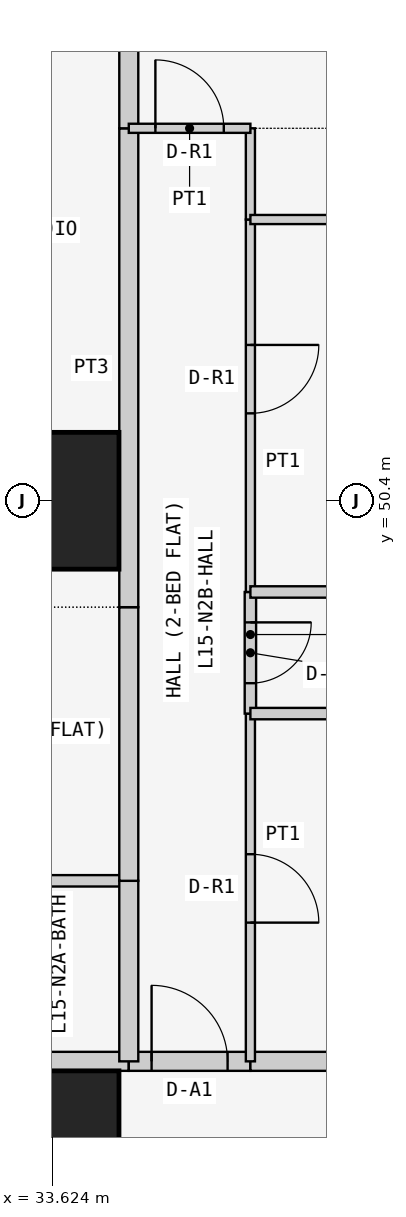
"""IFC4 building model, lengths in metres.
Left out: names, types, materials, properties, quantities, classifications, styles, units other than length and angle.
Written with IfcOpenShell. Run it as: python <this file> out.ifc"""

import sys

from ifc_helpers import new_model, si_unit, direction, frame, frame_2d, origin, origin_2d, place, context, subcontext, project, spatial, rectangle, extrude, element, fill, save


model = new_model("IFC4")
c1 = context("Model", 3, precision=1e-05, world=origin(), true_north=direction((0.0, 1.0)))
c2 = subcontext(c1, "Body", "Model", "MODEL_VIEW")
j1 = project(units=[si_unit("LENGTHUNIT", "METRE"), si_unit("PLANEANGLEUNIT", "RADIAN")], contexts=[c1])
p1 = place(None, origin())
s1 = spatial("IfcSite", under=j1, at=p1, CompositionType="ELEMENT")
p2 = place(p1, origin())
s2 = spatial("IfcBuilding", under=s1, at=p2, CompositionType="ELEMENT")
p3 = place(p2, frame((0.0, 0.0, 63.3)))
s3 = spatial("IfcBuildingStorey", under=s2, at=p3, CompositionType="ELEMENT", Elevation=63.3)
for number, where, z_axis, x_axis in (
    (1, (33.6, 42.0, 0.0), (0.0, 0.0, 1.0), (1.0, 0.0, 0.0)),
    (2, (33.6, 50.4, 0.0), (0.0, 0.0, 1.0), (1.0, 0.0, 0.0)),
):
    element("IfcColumn", number, at=place(p3, frame(where, z_axis=z_axis, x_axis=x_axis)), inside=s3, PredefinedType="COLUMN", context=c2, shape_type="SweptSolid", body=[
        extrude(rectangle(XDim=1.8, YDim=1.8, at=origin_2d()), origin(), (0.0, 0.0, 1.0), 3.6),
    ])
p4 = place(p3, frame((32.0, 43.025, 0.0), z_axis=(0.0, 0.0, 1.0), x_axis=(1.0, 0.0, 0.0)))
e3 = element("IfcWall", 3, at=p4, inside=s3, PredefinedType="PARTITIONING", context=c2, shape_type="SweptSolid", body=[
    extrude(rectangle(XDim=2.629, YDim=0.25, at=frame_2d((1.314, 0.0))), origin(), (0.0, 0.0, 1.0), 3.45),
])
p5 = place(p3, frame((34.629, 43.025, 0.0), z_axis=(0.0, 0.0, 1.0), x_axis=(1.0, 0.0, 0.0)))
e4 = element("IfcWall", 4, at=p5, inside=s3, PredefinedType="PARTITIONING", context=c2, shape_type="SweptSolid", body=[
    extrude(rectangle(XDim=1.6, YDim=0.25, at=frame_2d((0.8, 0.0))), origin(), (0.0, 0.0, 1.0), 3.45),
])
p6 = place(p5, frame((0.3, 0.0, 0.0)))
e5 = element("IfcOpeningElement", 5, at=p6, cuts=e4, PredefinedType="OPENING", context=c2, shape_type="SweptSolid", body=[
    extrude(rectangle(XDim=1.0, YDim=2.1, at=frame_2d((0.5, 1.05))), frame((0.0, 0.135, 0.0), z_axis=(0.0, -1.0, 0.0), x_axis=(1.0, 0.0, 0.0)), (0.0, 0.0, 1.0), 0.27),
])
p7 = place(p3, frame((36.229, 43.025, 0.0), z_axis=(0.0, 0.0, 1.0), x_axis=(1.0, 0.0, 0.0)))
e6 = element("IfcWall", 6, at=p7, inside=s3, PredefinedType="PARTITIONING", context=c2, shape_type="SweptSolid", body=[
    extrude(rectangle(XDim=6.471, YDim=0.25, at=frame_2d((3.235, 0.0))), origin(), (0.0, 0.0, 1.0), 3.45),
])
p8 = place(p3, frame((32.0, 45.4, 0.0), z_axis=(0.0, 0.0, 1.0), x_axis=(1.0, 0.0, 0.0)))
e7 = element("IfcWall", 7, at=p8, inside=s3, PredefinedType="PARTITIONING", context=c2, shape_type="SweptSolid", body=[
    extrude(rectangle(XDim=2.629, YDim=0.15, at=frame_2d((1.314, 0.0))), origin(), (0.0, 0.0, 1.0), 3.45),
])
p9 = place(p3, frame((34.629, 45.4, 0.0), z_axis=(0.0, 0.0, 1.0), x_axis=(0.0, -1.0, 0.0)))
e8 = element("IfcWall", 8, at=p9, inside=s3, PredefinedType="PARTITIONING", context=c2, shape_type="SweptSolid", body=[
    extrude(rectangle(XDim=2.375, YDim=0.25, at=frame_2d((1.188, 0.0))), origin(), (0.0, 0.0, 1.0), 3.45),
])
p10 = place(p3, frame((34.629, 49.0, 0.0), z_axis=(0.0, 0.0, 1.0), x_axis=(0.0, -1.0, 0.0)))
e9 = element("IfcWall", 9, at=p10, inside=s3, PredefinedType="PARTITIONING", context=c2, shape_type="SweptSolid", body=[
    extrude(rectangle(XDim=3.6, YDim=0.25, at=frame_2d((1.8, 0.0))), origin(), (0.0, 0.0, 1.0), 3.45),
])
p11 = place(p3, frame((34.629, 55.3, 0.0), z_axis=(0.0, 0.0, 1.0), x_axis=(0.0, -1.0, 0.0)))
e10 = element("IfcWall", 10, at=p11, inside=s3, PredefinedType="PARTITIONING", context=c2, shape_type="SweptSolid", body=[
    extrude(rectangle(XDim=6.3, YDim=0.25, at=frame_2d((3.15, 0.0))), origin(), (0.0, 0.0, 1.0), 3.45),
])
p12 = place(p3, frame((34.629, 59.45, 0.0), z_axis=(0.0, 0.0, 1.0), x_axis=(0.0, -1.0, 0.0)))
e11 = element("IfcWall", 11, at=p12, inside=s3, PredefinedType="PARTITIONING", context=c2, shape_type="SweptSolid", body=[
    extrude(rectangle(XDim=4.15, YDim=0.25, at=frame_2d((2.075, 0.0))), origin(), (0.0, 0.0, 1.0), 3.45),
])
p13 = place(p3, frame((36.229, 47.6, 0.0), z_axis=(0.0, 0.0, 1.0), x_axis=(0.0, -1.0, 0.0)))
e12 = element("IfcWall", 12, at=p13, inside=s3, PredefinedType="PARTITIONING", context=c2, shape_type="SweptSolid", body=[
    extrude(rectangle(XDim=4.575, YDim=0.12, at=frame_2d((2.288, 0.0))), origin(), (0.0, 0.0, 1.0), 3.45),
])
p14 = place(p13, frame((1.85, 0.0, 0.0)))
e13 = element("IfcOpeningElement", 13, at=p14, cuts=e12, PredefinedType="OPENING", context=c2, shape_type="SweptSolid", body=[
    extrude(rectangle(XDim=0.9, YDim=2.1, at=frame_2d((0.45, 1.05))), frame((0.0, 0.07, 0.0), z_axis=(0.0, -1.0, 0.0), x_axis=(1.0, 0.0, 0.0)), (0.0, 0.0, 1.0), 0.14),
])
p15 = place(p3, frame((36.229, 49.2, 0.0), z_axis=(0.0, 0.0, 1.0), x_axis=(0.0, -1.0, 0.0)))
e14 = element("IfcWall", 14, at=p15, inside=s3, PredefinedType="PARTITIONING", context=c2, shape_type="SweptSolid", body=[
    extrude(rectangle(XDim=1.6, YDim=0.15, at=frame_2d((0.8, 0.0))), origin(), (0.0, 0.0, 1.0), 3.45),
])
p16 = place(p15, frame((0.4, 0.0, 0.0)))
e15 = element("IfcOpeningElement", 15, at=p16, cuts=e14, PredefinedType="OPENING", context=c2, shape_type="SweptSolid", body=[
    extrude(rectangle(XDim=0.8, YDim=2.1, at=frame_2d((0.4, 1.05))), frame((0.0, 0.085, 0.0), z_axis=(0.0, -1.0, 0.0), x_axis=(1.0, 0.0, 0.0)), (0.0, 0.0, 1.0), 0.17),
])
p17 = place(p3, frame((36.229, 54.1, 0.0), z_axis=(0.0, 0.0, 1.0), x_axis=(0.0, -1.0, 0.0)))
e16 = element("IfcWall", 16, at=p17, inside=s3, PredefinedType="PARTITIONING", context=c2, shape_type="SweptSolid", body=[
    extrude(rectangle(XDim=4.9, YDim=0.12, at=frame_2d((2.45, 0.0))), origin(), (0.0, 0.0, 1.0), 3.45),
])
p18 = place(p17, frame((1.65, 0.0, 0.0)))
e17 = element("IfcOpeningElement", 17, at=p18, cuts=e16, PredefinedType="OPENING", context=c2, shape_type="SweptSolid", body=[
    extrude(rectangle(XDim=0.9, YDim=2.1, at=frame_2d((0.45, 1.05))), frame((0.0, 0.07, 0.0), z_axis=(0.0, -1.0, 0.0), x_axis=(1.0, 0.0, 0.0)), (0.0, 0.0, 1.0), 0.14),
])
p19 = place(p3, frame((36.229, 55.3, 0.0), z_axis=(0.0, 0.0, 1.0), x_axis=(0.0, -1.0, 0.0)))
e18 = element("IfcWall", 18, at=p19, inside=s3, PredefinedType="PARTITIONING", context=c2, shape_type="SweptSolid", body=[
    extrude(rectangle(XDim=1.2, YDim=0.12, at=frame_2d((0.6, 0.0))), origin(), (0.0, 0.0, 1.0), 3.45),
])
p20 = place(p3, frame((34.629, 55.3, 0.0), z_axis=(0.0, 0.0, 1.0), x_axis=(1.0, 0.0, 0.0)))
e19 = element("IfcWall", 19, at=p20, inside=s3, PredefinedType="PARTITIONING", context=c2, shape_type="SweptSolid", body=[
    extrude(rectangle(XDim=1.6, YDim=0.12, at=frame_2d((0.8, 0.0))), origin(), (0.0, 0.0, 1.0), 3.45),
])
p21 = place(p20, frame((0.35, 0.0, 0.0)))
e20 = element("IfcOpeningElement", 20, at=p21, cuts=e19, PredefinedType="OPENING", context=c2, shape_type="SweptSolid", body=[
    extrude(rectangle(XDim=0.9, YDim=2.1, at=frame_2d((0.45, 1.05))), frame((0.0, 0.07, 0.0), z_axis=(0.0, -1.0, 0.0), x_axis=(1.0, 0.0, 0.0)), (0.0, 0.0, 1.0), 0.14),
])
for number, where, z_axis, x_axis in (
    (21, (36.229, 47.6, 0.0), (0.0, 0.0, 1.0), (1.0, 0.0, 0.0)),
    (22, (36.229, 49.2, 0.0), (0.0, 0.0, 1.0), (1.0, 0.0, 0.0)),
):
    element("IfcWall", number, at=place(p3, frame(where, z_axis=z_axis, x_axis=x_axis)), inside=s3, PredefinedType="PARTITIONING", context=c2, shape_type="SweptSolid", body=[
        extrude(rectangle(XDim=6.471, YDim=0.15, at=frame_2d((3.235, 0.0))), origin(), (0.0, 0.0, 1.0), 3.45),
    ])
p22 = place(p3, frame((36.229, 54.1, 0.0), z_axis=(0.0, 0.0, 1.0), x_axis=(1.0, 0.0, 0.0)))
e23 = element("IfcWall", 23, at=p22, inside=s3, PredefinedType="PARTITIONING", context=c2, shape_type="SweptSolid", body=[
    extrude(rectangle(XDim=6.471, YDim=0.12, at=frame_2d((3.235, 0.0))), origin(), (0.0, 0.0, 1.0), 3.45),
])
p23 = place(p6, origin())
e24 = element("IfcDoor", 24, at=p23, inside=s3, OperationType="SINGLE_SWING_LEFT", PredefinedType="DOOR", context=c2, shape_type="SweptSolid", body=[
    extrude(rectangle(XDim=1.0, YDim=2.1, at=frame_2d((0.5, 1.05))), frame((0.0, 0.025, 0.0), z_axis=(0.0, -1.0, 0.0), x_axis=(1.0, 0.0, 0.0)), (0.0, 0.0, 1.0), 0.05),
])
fill(e5, e24)
p24 = place(p14, origin())
e25 = element("IfcDoor", 25, at=p24, inside=s3, OperationType="SINGLE_SWING_RIGHT", PredefinedType="DOOR", context=c2, shape_type="SweptSolid", body=[
    extrude(rectangle(XDim=0.9, YDim=2.1, at=frame_2d((0.45, 1.05))), frame((0.0, 0.025, 0.0), z_axis=(0.0, -1.0, 0.0), x_axis=(1.0, 0.0, 0.0)), (0.0, 0.0, 1.0), 0.05),
])
fill(e13, e25)
p25 = place(p16, origin())
e26 = element("IfcDoor", 26, at=p25, inside=s3, OperationType="SINGLE_SWING_LEFT", PredefinedType="DOOR", context=c2, shape_type="SweptSolid", body=[
    extrude(rectangle(XDim=0.8, YDim=2.1, at=frame_2d((0.4, 1.05))), frame((0.0, 0.025, 0.0), z_axis=(0.0, -1.0, 0.0), x_axis=(1.0, 0.0, 0.0)), (0.0, 0.0, 1.0), 0.05),
])
fill(e15, e26)
p26 = place(p18, origin())
e27 = element("IfcDoor", 27, at=p26, inside=s3, OperationType="SINGLE_SWING_LEFT", PredefinedType="DOOR", context=c2, shape_type="SweptSolid", body=[
    extrude(rectangle(XDim=0.9, YDim=2.1, at=frame_2d((0.45, 1.05))), frame((0.0, 0.025, 0.0), z_axis=(0.0, -1.0, 0.0), x_axis=(1.0, 0.0, 0.0)), (0.0, 0.0, 1.0), 0.05),
])
fill(e17, e27)
p27 = place(p21, origin())
e28 = element("IfcDoor", 28, at=p27, inside=s3, OperationType="SINGLE_SWING_LEFT", PredefinedType="DOOR", context=c2, shape_type="SweptSolid", body=[
    extrude(rectangle(XDim=0.9, YDim=2.1, at=frame_2d((0.45, 1.05))), frame((0.0, 0.025, 0.0), z_axis=(0.0, -1.0, 0.0), x_axis=(1.0, 0.0, 0.0)), (0.0, 0.0, 1.0), 0.05),
])
fill(e20, e28)
save(model, sys.argv[1])
